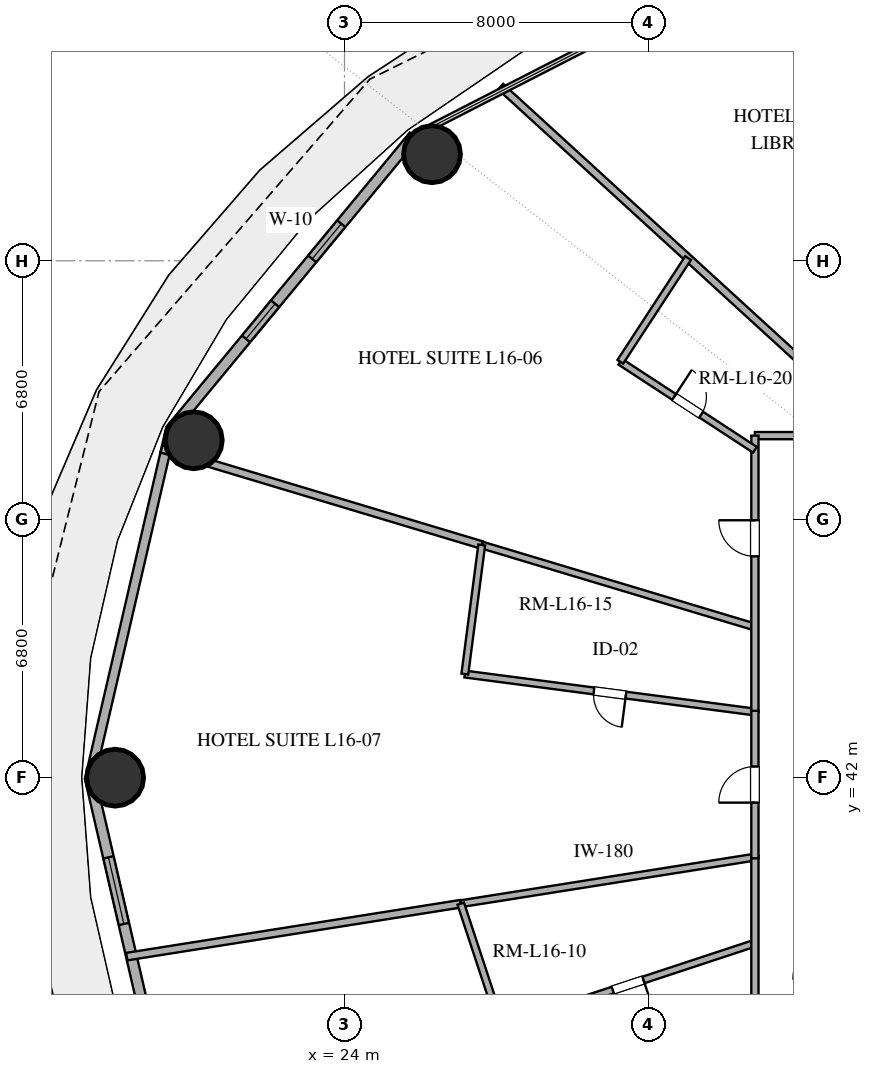
"""IFC4 building model, lengths in metres.
Left out: names, types, materials, properties, quantities, classifications, styles, units other than length and angle.
Written with IfcOpenShell. Run it as: python <this file> out.ifc"""

import sys

from ifc_helpers import new_model, si_unit, direction, frame, frame_2d, origin, origin_2d, place, context, subcontext, project, spatial, rectangle, hollow_circle, extrude, element, fill, save


model = new_model("IFC4")
c1 = context("Model", 3, precision=1e-05, world=origin(), true_north=direction((0.0, 1.0)))
c2 = subcontext(c1, "Body", "Model", "MODEL_VIEW")
j1 = project(units=[si_unit("LENGTHUNIT", "METRE"), si_unit("PLANEANGLEUNIT", "RADIAN")], contexts=[c1])
p1 = place(None, origin())
s1 = spatial("IfcSite", under=j1, at=p1, CompositionType="ELEMENT")
p2 = place(p1, origin())
s2 = spatial("IfcBuilding", under=s1, at=p2, CompositionType="ELEMENT")
p3 = place(p2, frame((0.0, 0.0, 67.8)))
s3 = spatial("IfcBuildingStorey", under=s2, at=p3, CompositionType="ELEMENT", Elevation=67.8)
for number, where, z_axis, x_axis in (
    (1, (26.303, 58.405, 0.0), (0.0, 0.0, 1.0), (1.0, 0.0, 0.0)),
    (2, (20.034, 50.878, 0.0), (0.0, 0.0, 1.0), (1.0, 0.0, 0.0)),
    (3, (17.965, 42.0, 0.0), (0.0, 0.0, 1.0), (1.0, 0.0, 0.0)),
):
    element("IfcColumn", number, at=place(p3, frame(where, z_axis=z_axis, x_axis=x_axis)), inside=s3, PredefinedType="COLUMN", context=c2, shape_type="SweptSolid", body=[
        extrude(hollow_circle(Radius=0.75, WallThickness=0.04, at=origin_2d()), origin(), (0.0, 0.0, 1.0), 3.38),
    ])
p4 = place(p3, frame((25.826, 58.886, 0.0), z_axis=(0.0, 0.0, 1.0), x_axis=(-0.637296809613, -0.770618437657, 0.0)))
e4 = element("IfcWall", 4, at=p4, inside=s3, PredefinedType="SOLIDWALL", context=c2, shape_type="SweptSolid", body=[
    extrude(rectangle(XDim=10.053, YDim=0.28, at=frame_2d((5.027, 0.0))), origin(), (0.0, 0.0, 1.0), 3.38),
])
p5 = place(p4, frame((2.998, 0.0, 0.85)))
e5 = element("IfcOpeningElement", 5, at=p5, cuts=e4, PredefinedType="OPENING", context=c2, shape_type="SweptSolid", body=[
    extrude(rectangle(XDim=1.2, YDim=1.6, at=frame_2d((0.6, 0.8))), frame((0.0, 0.15, 0.0), z_axis=(0.0, -1.0, 0.0), x_axis=(1.0, 0.0, 0.0)), (0.0, 0.0, 1.0), 0.3),
])
p6 = place(p4, frame((5.73, 0.0, 0.85)))
e6 = element("IfcOpeningElement", 6, at=p6, cuts=e4, PredefinedType="OPENING", context=c2, shape_type="SweptSolid", body=[
    extrude(rectangle(XDim=1.2, YDim=1.6, at=frame_2d((0.6, 0.8))), frame((0.0, 0.15, 0.0), z_axis=(0.0, -1.0, 0.0), x_axis=(1.0, 0.0, 0.0)), (0.0, 0.0, 1.0), 0.3),
])
p7 = place(p3, frame((19.419, 51.138, 0.0), z_axis=(0.0, 0.0, 1.0), x_axis=(-0.225454452941, -0.974253709076, 0.0)))
e7 = element("IfcWall", 7, at=p7, inside=s3, PredefinedType="SOLIDWALL", context=c2, shape_type="SweptSolid", body=[
    extrude(rectangle(XDim=9.38, YDim=0.25, at=frame_2d((4.69, 0.0))), origin(), (0.0, 0.0, 1.0), 3.38),
])
p8 = place(p3, frame((17.304, 42.0, 0.0), z_axis=(0.0, 0.0, 1.0), x_axis=(0.225454452941, -0.974253709076, 0.0)))
e8 = element("IfcWall", 8, at=p8, inside=s3, PredefinedType="SOLIDWALL", context=c2, shape_type="SweptSolid", body=[
    extrude(rectangle(XDim=9.38, YDim=0.28, at=frame_2d((4.69, 0.0))), origin(), (0.0, 0.0, 1.0), 3.38),
])
p9 = place(p8, frame((2.152, 0.0, 0.85)))
e9 = element("IfcOpeningElement", 9, at=p9, cuts=e8, PredefinedType="OPENING", context=c2, shape_type="SweptSolid", body=[
    extrude(rectangle(XDim=1.8, YDim=2.2, at=frame_2d((0.9, 1.1))), frame((0.0, 0.15, 0.0), z_axis=(0.0, -1.0, 0.0), x_axis=(1.0, 0.0, 0.0)), (0.0, 0.0, 1.0), 0.3),
])
p10 = place(p8, frame((6.735, 0.0, 0.0)))
e10 = element("IfcOpeningElement", 10, at=p10, cuts=e8, PredefinedType="OPENING", context=c2, shape_type="SweptSolid", body=[
    extrude(rectangle(XDim=1.1, YDim=2.25, at=frame_2d((0.55, 1.125))), frame((0.0, 0.15, 0.0), z_axis=(0.0, -1.0, 0.0), x_axis=(1.0, 0.0, 0.0)), (0.0, 0.0, 1.0), 0.3),
])
p11 = place(p3, frame((18.271, 37.292, 0.0), z_axis=(0.0, 0.0, 1.0), x_axis=(0.987691229297, 0.156416225401, 0.0)))
e11 = element("IfcWall", 11, at=p11, inside=s3, PredefinedType="PARTITIONING", context=c2, shape_type="SweptSolid", body=[
    extrude(rectangle(XDim=8.898, YDim=0.2, at=frame_2d((4.449, 0.0))), origin(), (0.0, 0.0, 1.0), 2.74),
])
p12 = place(p3, frame((19.184, 50.653, 0.0), z_axis=(0.0, 0.0, 1.0), x_axis=(0.957749889613, -0.287602414708, 0.0)))
e12 = element("IfcWall", 12, at=p12, inside=s3, PredefinedType="PARTITIONING", context=c2, shape_type="SweptSolid", body=[
    extrude(rectangle(XDim=8.8, YDim=0.2, at=frame_2d((4.4, 0.0))), origin(), (0.0, 0.0, 1.0), 2.74),
])
p13 = place(p3, frame((27.06, 38.683, 0.0), z_axis=(0.0, 0.0, 1.0), x_axis=(0.987690363599, 0.156421691762, 0.0)))
e13 = element("IfcWall", 13, at=p13, inside=s3, PredefinedType="PLUMBINGWALL", context=c2, shape_type="SweptSolid", body=[
    extrude(rectangle(XDim=7.837, YDim=0.18, at=frame_2d((3.918, 0.0))), origin(), (0.0, 0.0, 1.0), 2.74),
])
p14 = place(p3, frame((34.8, 43.728, 0.0), z_axis=(0.0, 0.0, 1.0), x_axis=(-0.991543548491, 0.129774386708, 0.0)))
e14 = element("IfcWall", 14, at=p14, inside=s3, PredefinedType="PLUMBINGWALL", context=c2, shape_type="SweptSolid", body=[
    extrude(rectangle(XDim=7.698, YDim=0.18, at=frame_2d((3.849, 0.0))), origin(), (0.0, 0.0, 1.0), 2.74),
])
p15 = place(p14, frame((3.424, 0.0, 0.0)))
e15 = element("IfcOpeningElement", 15, at=p15, cuts=e14, PredefinedType="OPENING", context=c2, shape_type="SweptSolid", body=[
    extrude(rectangle(XDim=0.85, YDim=2.1, at=frame_2d((0.425, 1.05))), frame((0.0, 0.1, 0.0), z_axis=(0.0, -1.0, 0.0), x_axis=(1.0, 0.0, 0.0)), (0.0, 0.0, 1.0), 0.2),
])
p16 = place(p3, frame((27.612, 48.122, 0.0), z_axis=(0.0, 0.0, 1.0), x_axis=(0.95775642604, -0.28758064674, 0.0)))
e16 = element("IfcWall", 16, at=p16, inside=s3, PredefinedType="PLUMBINGWALL", context=c2, shape_type="SweptSolid", body=[
    extrude(rectangle(XDim=7.506, YDim=0.18, at=frame_2d((3.753, 0.0))), origin(), (0.0, 0.0, 1.0), 2.74),
])
p17 = place(p3, frame((34.8, 37.646, 0.0), z_axis=(0.0, 0.0, 1.0), x_axis=(-0.949662150081, -0.313275917849, 0.0)))
e17 = element("IfcWall", 17, at=p17, inside=s3, PredefinedType="PLUMBINGWALL", context=c2, shape_type="SweptSolid", body=[
    extrude(rectangle(XDim=7.026, YDim=0.18, at=frame_2d((3.513, 0.0))), origin(), (0.0, 0.0, 1.0), 2.74),
])
p18 = place(p17, frame((3.088, 0.0, 0.0)))
e18 = element("IfcOpeningElement", 18, at=p18, cuts=e17, PredefinedType="OPENING", context=c2, shape_type="SweptSolid", body=[
    extrude(rectangle(XDim=0.85, YDim=2.1, at=frame_2d((0.425, 1.05))), frame((0.0, 0.1, 0.0), z_axis=(0.0, -1.0, 0.0), x_axis=(1.0, 0.0, 0.0)), (0.0, 0.0, 1.0), 0.2),
])
p19 = place(p3, frame((38.154, 51.0, 0.0), z_axis=(0.0, 0.0, 1.0), x_axis=(-0.738119160364, 0.674670367738, 0.0)))
e19 = element("IfcWall", 19, at=p19, inside=s3, PredefinedType="PARTITIONING", context=c2, shape_type="SweptSolid", body=[
    extrude(rectangle(XDim=13.61, YDim=0.2, at=frame_2d((6.805, 0.0))), origin(), (0.0, 0.0, 1.0), 2.74),
])
p20 = place(p3, frame((34.8, 51.0, 0.0), z_axis=(0.0, 0.0, 1.0), x_axis=(1.0, 0.0, 0.0)))
e20 = element("IfcWall", 20, at=p20, inside=s3, PredefinedType="PARTITIONING", context=c2, shape_type="SweptSolid", body=[
    extrude(rectangle(XDim=13.839, YDim=0.19, at=frame_2d((6.919, 0.0))), origin(), (0.0, 0.0, 1.0), 2.74),
])
p21 = place(p20, frame((5.965, 0.0, 0.0)))
e21 = element("IfcOpeningElement", 21, at=p21, cuts=e20, PredefinedType="OPENING", context=c2, shape_type="SweptSolid", body=[
    extrude(rectangle(XDim=1.0, YDim=2.2, at=frame_2d((0.5, 1.1))), frame((0.0, 0.105, 0.0), z_axis=(0.0, -1.0, 0.0), x_axis=(1.0, 0.0, 0.0)), (0.0, 0.0, 1.0), 0.21),
])
p22 = place(p20, frame((10.493, 0.0, 0.0)))
e22 = element("IfcOpeningElement", 22, at=p22, cuts=e20, PredefinedType="OPENING", context=c2, shape_type="SweptSolid", body=[
    extrude(rectangle(XDim=0.95, YDim=2.15, at=frame_2d((0.475, 1.075))), frame((0.0, 0.105, 0.0), z_axis=(0.0, -1.0, 0.0), x_axis=(1.0, 0.0, 0.0)), (0.0, 0.0, 1.0), 0.21),
])
p23 = place(p3, frame((34.8, 43.728, 0.0), z_axis=(0.0, 0.0, 1.0), x_axis=(0.0, 1.0, 0.0)))
e23 = element("IfcWall", 23, at=p23, inside=s3, PredefinedType="PARTITIONING", context=c2, shape_type="SweptSolid", body=[
    extrude(rectangle(XDim=7.272, YDim=0.19, at=frame_2d((3.636, 0.0))), origin(), (0.0, 0.0, 1.0), 2.74),
])
p24 = place(p23, frame((4.096, 0.0, 0.0)))
e24 = element("IfcOpeningElement", 24, at=p24, cuts=e23, PredefinedType="OPENING", context=c2, shape_type="SweptSolid", body=[
    extrude(rectangle(XDim=0.95, YDim=2.15, at=frame_2d((0.475, 1.075))), frame((0.0, 0.105, 0.0), z_axis=(0.0, -1.0, 0.0), x_axis=(1.0, 0.0, 0.0)), (0.0, 0.0, 1.0), 0.21),
])
p25 = place(p3, frame((34.8, 33.0, 0.0), z_axis=(0.0, 0.0, 1.0), x_axis=(0.0, 1.0, 0.0)))
e25 = element("IfcWall", 25, at=p25, inside=s3, PredefinedType="PARTITIONING", context=c2, shape_type="SweptSolid", body=[
    extrude(rectangle(XDim=6.942, YDim=0.19, at=frame_2d((3.471, 0.0))), origin(), (0.0, 0.0, 1.0), 2.74),
])
p26 = place(p25, frame((1.865, 0.0, 0.0)))
e26 = element("IfcOpeningElement", 26, at=p26, cuts=e25, PredefinedType="OPENING", context=c2, shape_type="SweptSolid", body=[
    extrude(rectangle(XDim=0.95, YDim=2.15, at=frame_2d((0.475, 1.075))), frame((0.0, 0.105, 0.0), z_axis=(0.0, -1.0, 0.0), x_axis=(1.0, 0.0, 0.0)), (0.0, 0.0, 1.0), 0.21),
])
p27 = place(p3, frame((31.258, 52.944, 0.0), z_axis=(0.0, 0.0, 1.0), x_axis=(0.837031612028, -0.5471545307, 0.0)))
e27 = element("IfcWall", 27, at=p27, inside=s3, PredefinedType="PLUMBINGWALL", context=c2, shape_type="SweptSolid", body=[
    extrude(rectangle(XDim=4.231, YDim=0.18, at=frame_2d((2.116, 0.0))), origin(), (0.0, 0.0, 1.0), 2.74),
])
p28 = place(p27, frame((1.691, 0.0, 0.0)))
e28 = element("IfcOpeningElement", 28, at=p28, cuts=e27, PredefinedType="OPENING", context=c2, shape_type="SweptSolid", body=[
    extrude(rectangle(XDim=0.85, YDim=2.1, at=frame_2d((0.425, 1.05))), frame((0.0, 0.1, 0.0), z_axis=(0.0, -1.0, 0.0), x_axis=(1.0, 0.0, 0.0)), (0.0, 0.0, 1.0), 0.2),
])
p29 = place(p3, frame((34.8, 39.877, 0.0), z_axis=(0.0, 0.0, 1.0), x_axis=(0.0, 1.0, 0.0)))
e29 = element("IfcWall", 29, at=p29, inside=s3, PredefinedType="PARTITIONING", context=c2, shape_type="SweptSolid", body=[
    extrude(rectangle(XDim=3.883, YDim=0.19, at=frame_2d((1.941, 0.0))), origin(), (0.0, 0.0, 1.0), 2.74),
])
p30 = place(p29, frame((1.467, 0.0, 0.0)))
e30 = element("IfcOpeningElement", 30, at=p30, cuts=e29, PredefinedType="OPENING", context=c2, shape_type="SweptSolid", body=[
    extrude(rectangle(XDim=0.95, YDim=2.15, at=frame_2d((0.475, 1.075))), frame((0.0, 0.105, 0.0), z_axis=(0.0, -1.0, 0.0), x_axis=(1.0, 0.0, 0.0)), (0.0, 0.0, 1.0), 0.21),
])
p31 = place(p3, frame((27.167, 44.727, 0.0), z_axis=(0.0, 0.0, 1.0), x_axis=(0.129823772588, 0.991537083558, 0.0)))
e31 = element("IfcWall", 31, at=p31, inside=s3, PredefinedType="PLUMBINGWALL", context=c2, shape_type="SweptSolid", body=[
    extrude(rectangle(XDim=3.425, YDim=0.18, at=frame_2d((1.712, 0.0))), origin(), (0.0, 0.0, 1.0), 2.74),
])
p32 = place(p3, frame((28.128, 35.445, 0.0), z_axis=(0.0, 0.0, 1.0), x_axis=(-0.313262541659, 0.949666562533, 0.0)))
e32 = element("IfcWall", 32, at=p32, inside=s3, PredefinedType="PLUMBINGWALL", context=c2, shape_type="SweptSolid", body=[
    extrude(rectangle(XDim=3.41, YDim=0.18, at=frame_2d((1.705, 0.0))), origin(), (0.0, 0.0, 1.0), 2.74),
])
p33 = place(p3, frame((33.042, 55.672, 0.0), z_axis=(0.0, 0.0, 1.0), x_axis=(-0.547176717469, -0.837017108463, 0.0)))
e33 = element("IfcWall", 33, at=p33, inside=s3, PredefinedType="PLUMBINGWALL", context=c2, shape_type="SweptSolid", body=[
    extrude(rectangle(XDim=3.26, YDim=0.18, at=frame_2d((1.63, 0.0))), origin(), (0.0, 0.0, 1.0), 2.74),
])
p34 = place(p5, origin())
e34 = element("IfcWindow", 34, at=p34, inside=s3, PartitioningType="SINGLE_PANEL", PredefinedType="WINDOW", context=c2, shape_type="SweptSolid", body=[
    extrude(rectangle(XDim=1.2, YDim=1.6, at=frame_2d((0.6, 0.8))), frame((0.0, 0.03, 0.0), z_axis=(0.0, -1.0, 0.0), x_axis=(1.0, 0.0, 0.0)), (0.0, 0.0, 1.0), 0.06),
])
fill(e5, e34)
p35 = place(p6, origin())
e35 = element("IfcWindow", 35, at=p35, inside=s3, PartitioningType="SINGLE_PANEL", PredefinedType="WINDOW", context=c2, shape_type="SweptSolid", body=[
    extrude(rectangle(XDim=1.2, YDim=1.6, at=frame_2d((0.6, 0.8))), frame((0.0, 0.03, 0.0), z_axis=(0.0, -1.0, 0.0), x_axis=(1.0, 0.0, 0.0)), (0.0, 0.0, 1.0), 0.06),
])
fill(e6, e35)
p36 = place(p9, origin())
e36 = element("IfcWindow", 36, at=p36, inside=s3, PartitioningType="SINGLE_PANEL", PredefinedType="WINDOW", context=c2, shape_type="SweptSolid", body=[
    extrude(rectangle(XDim=1.8, YDim=2.2, at=frame_2d((0.9, 1.1))), frame((0.0, 0.03, 0.0), z_axis=(0.0, -1.0, 0.0), x_axis=(1.0, 0.0, 0.0)), (0.0, 0.0, 1.0), 0.06),
])
fill(e9, e36)
p37 = place(p15, origin())
e37 = element("IfcDoor", 37, at=p37, inside=s3, OperationType="SINGLE_SWING_LEFT", PredefinedType="DOOR", context=c2, shape_type="SweptSolid", body=[
    extrude(rectangle(XDim=0.85, YDim=2.1, at=frame_2d((0.425, 1.05))), frame((0.0, 0.025, 0.0), z_axis=(0.0, -1.0, 0.0), x_axis=(1.0, 0.0, 0.0)), (0.0, 0.0, 1.0), 0.05),
])
fill(e15, e37)
p38 = place(p18, origin())
e38 = element("IfcDoor", 38, at=p38, inside=s3, OperationType="SINGLE_SWING_LEFT", PredefinedType="DOOR", context=c2, shape_type="SweptSolid", body=[
    extrude(rectangle(XDim=0.85, YDim=2.1, at=frame_2d((0.425, 1.05))), frame((0.0, 0.025, 0.0), z_axis=(0.0, -1.0, 0.0), x_axis=(1.0, 0.0, 0.0)), (0.0, 0.0, 1.0), 0.05),
])
fill(e18, e38)
p39 = place(p24, origin())
e39 = element("IfcDoor", 39, at=p39, inside=s3, OperationType="SINGLE_SWING_RIGHT", PredefinedType="DOOR", context=c2, shape_type="SweptSolid", body=[
    extrude(rectangle(XDim=0.95, YDim=2.15, at=frame_2d((0.475, 1.075))), frame((0.0, 0.025, 0.0), z_axis=(0.0, -1.0, 0.0), x_axis=(1.0, 0.0, 0.0)), (0.0, 0.0, 1.0), 0.05),
])
fill(e24, e39)
p40 = place(p28, origin())
e40 = element("IfcDoor", 40, at=p40, inside=s3, OperationType="SINGLE_SWING_LEFT", PredefinedType="DOOR", context=c2, shape_type="SweptSolid", body=[
    extrude(rectangle(XDim=0.85, YDim=2.1, at=frame_2d((0.425, 1.05))), frame((0.0, 0.025, 0.0), z_axis=(0.0, -1.0, 0.0), x_axis=(1.0, 0.0, 0.0)), (0.0, 0.0, 1.0), 0.05),
])
fill(e28, e40)
p41 = place(p30, origin())
e41 = element("IfcDoor", 41, at=p41, inside=s3, OperationType="SINGLE_SWING_LEFT", PredefinedType="DOOR", context=c2, shape_type="SweptSolid", body=[
    extrude(rectangle(XDim=0.95, YDim=2.15, at=frame_2d((0.475, 1.075))), frame((0.0, 0.025, 0.0), z_axis=(0.0, -1.0, 0.0), x_axis=(1.0, 0.0, 0.0)), (0.0, 0.0, 1.0), 0.05),
])
fill(e30, e41)
save(model, sys.argv[1])
